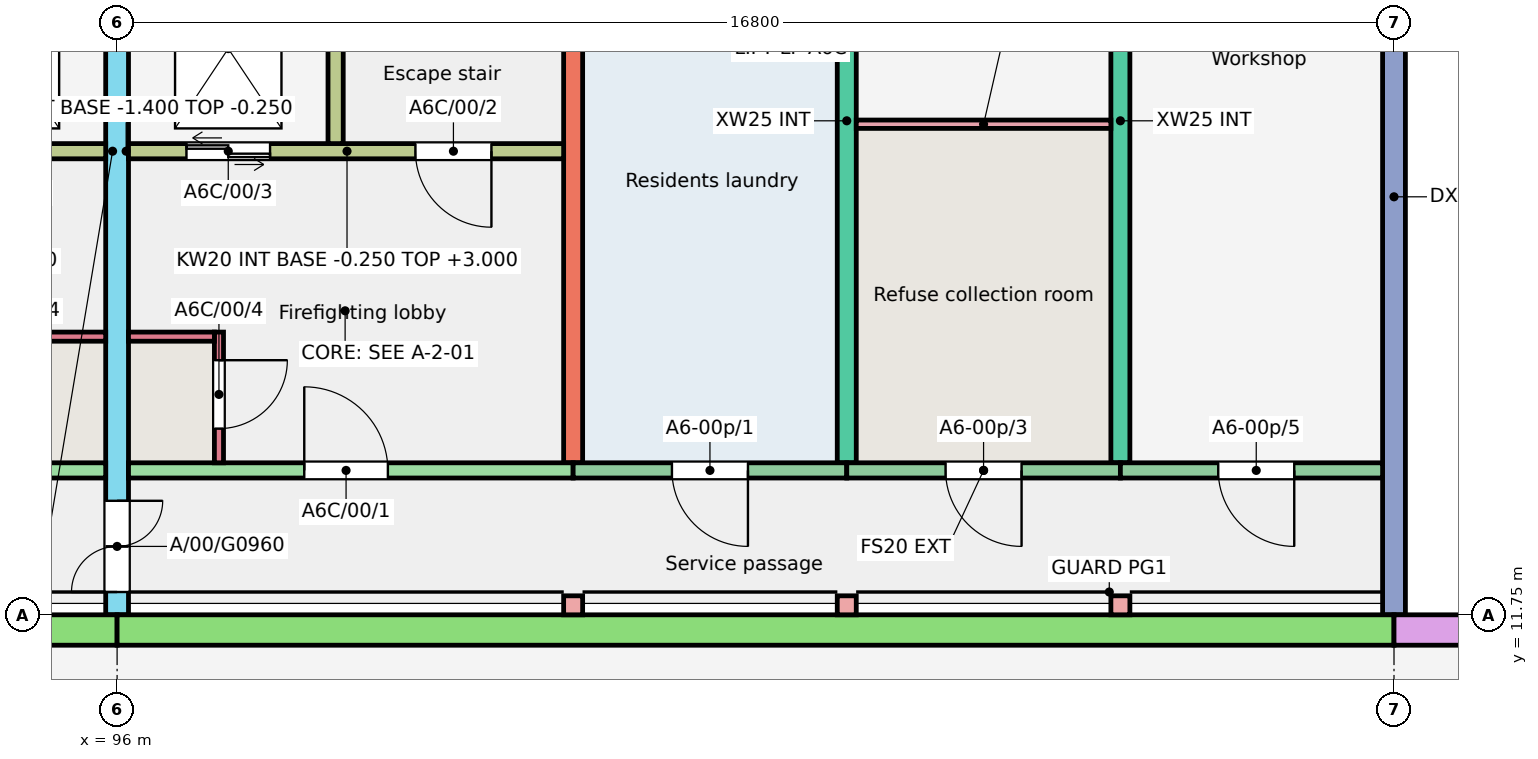
"""IFC4 building model, lengths in metres.
Left out: names, types, materials, properties, quantities, classifications, styles, units other than length and angle.
Written with IfcOpenShell. Run it as: python <this file> out.ifc"""

import sys

from ifc_helpers import new_model, si_unit, direction, frame, frame_2d, origin, origin_2d, place, context, subcontext, project, spatial, rectangle, extrude, element, fill, save


model = new_model("IFC4")
c1 = context("Model", 3, precision=1e-05, world=origin(), true_north=direction((0.0, 1.0)))
c2 = subcontext(c1, "Body", "Model", "MODEL_VIEW")
j1 = project(units=[si_unit("LENGTHUNIT", "METRE"), si_unit("PLANEANGLEUNIT", "RADIAN")], contexts=[c1])
p1 = place(None, origin())
s1 = spatial("IfcSite", under=j1, at=p1, CompositionType="ELEMENT")
p2 = place(p1, origin())
s2 = spatial("IfcBuilding", under=s1, at=p2, CompositionType="ELEMENT")
p3 = place(p2, origin())
s3 = spatial("IfcBuildingStorey", under=s2, at=p3, CompositionType="ELEMENT", Elevation=0.0)
p4 = place(p3, frame((96.0, 11.75, -0.25), z_axis=(0.0, 0.0, 1.0), x_axis=(0.0, 1.0, 0.0)))
e1 = element("IfcWall", 1, at=p4, inside=s3, PredefinedType="SHEAR", context=c2, shape_type="SweptSolid", body=[
    extrude(rectangle(XDim=11.0, YDim=0.3, at=frame_2d((5.5, 0.0))), origin(), (0.0, 0.0, 1.0), 3.25),
])
p5 = place(p4, frame((0.3, 0.0, 0.25)))
e2 = element("IfcOpeningElement", 2, at=p5, cuts=e1, PredefinedType="OPENING", context=c2, shape_type="SweptSolid", body=[
    extrude(rectangle(XDim=1.2, YDim=2.1, at=frame_2d((0.6, 1.05))), frame((0.0, 0.16, 0.0), z_axis=(0.0, -1.0, 0.0), x_axis=(1.0, 0.0, 0.0)), (0.0, 0.0, 1.0), 0.32),
])
for number, where, z_axis, x_axis in (
    (3, (102.0, 13.75, -0.25), (0.0, 0.0, 1.0), (0.0, 1.0, 0.0)),
    (4, (105.6, 13.75, -0.25), (0.0, 0.0, 1.0), (0.0, 1.0, 0.0)),
    (5, (109.2, 13.75, -0.25), (0.0, 0.0, 1.0), (0.0, 1.0, 0.0)),
):
    element("IfcWall", number, at=place(p3, frame(where, z_axis=z_axis, x_axis=x_axis)), inside=s3, PredefinedType="SHEAR", context=c2, shape_type="SweptSolid", body=[
        extrude(rectangle(XDim=9.0, YDim=0.25, at=frame_2d((4.5, 0.0))), origin(), (0.0, 0.0, 1.0), 3.25),
    ])
p6 = place(p3, frame((112.8, 11.75, -0.25), z_axis=(0.0, 0.0, 1.0), x_axis=(0.0, 1.0, 0.0)))
e6 = element("IfcWall", 6, at=p6, inside=s3, PredefinedType="SHEAR", context=c2, shape_type="SweptSolid", body=[
    extrude(rectangle(XDim=11.0, YDim=0.3, at=frame_2d((5.5, 0.0))), origin(), (0.0, 0.0, 1.0), 3.25),
])
p7 = place(p3, frame((90.0, 13.65, -0.25), z_axis=(0.0, 0.0, 1.0), x_axis=(1.0, 0.0, 0.0)))
e7 = element("IfcWall", 7, at=p7, inside=s3, PredefinedType="SHEAR", context=c2, shape_type="SweptSolid", body=[
    extrude(rectangle(XDim=5.85, YDim=0.2, at=frame_2d((2.925, 0.0))), origin(), (0.0, 0.0, 1.0), 3.25),
])
p8 = place(p7, frame((2.438, 0.0, 0.25)))
e8 = element("IfcOpeningElement", 8, at=p8, cuts=e7, PredefinedType="OPENING", context=c2, shape_type="SweptSolid", body=[
    extrude(rectangle(XDim=1.1, YDim=2.1, at=frame_2d((0.55, 1.05))), frame((0.0, 0.11, 0.0), z_axis=(0.0, -1.0, 0.0), x_axis=(1.0, 0.0, 0.0)), (0.0, 0.0, 1.0), 0.22),
])
p9 = place(p3, frame((90.125, 17.85, -0.25), z_axis=(0.0, 0.0, 1.0), x_axis=(1.0, 0.0, 0.0)))
e9 = element("IfcWall", 9, at=p9, inside=s3, PredefinedType="SHEAR", context=c2, shape_type="SweptSolid", body=[
    extrude(rectangle(XDim=5.725, YDim=0.2, at=frame_2d((2.863, 0.0))), origin(), (0.0, 0.0, 1.0), 3.25),
])
p10 = place(p9, frame((0.95, 0.0, 0.25)))
e10 = element("IfcOpeningElement", 10, at=p10, cuts=e9, PredefinedType="OPENING", context=c2, shape_type="SweptSolid", body=[
    extrude(rectangle(XDim=1.0, YDim=2.1, at=frame_2d((0.5, 1.05))), frame((0.0, 0.11, 0.0), z_axis=(0.0, -1.0, 0.0), x_axis=(1.0, 0.0, 0.0)), (0.0, 0.0, 1.0), 0.22),
])
p11 = place(p9, frame((3.863, 0.0, 0.25)))
e11 = element("IfcOpeningElement", 11, at=p11, cuts=e9, PredefinedType="OPENING", context=c2, shape_type="SweptSolid", body=[
    extrude(rectangle(XDim=1.1, YDim=2.1, at=frame_2d((0.55, 1.05))), frame((0.0, 0.11, 0.0), z_axis=(0.0, -1.0, 0.0), x_axis=(1.0, 0.0, 0.0)), (0.0, 0.0, 1.0), 0.22),
])
p12 = place(p3, frame((94.72, 15.41, -0.25), z_axis=(0.0, 0.0, 1.0), x_axis=(1.0, 0.0, 0.0)))
e12 = element("IfcWall", 12, at=p12, inside=s3, PredefinedType="SHEAR", context=c2, shape_type="SweptSolid", body=[
    extrude(rectangle(XDim=1.13, YDim=0.12, at=frame_2d((0.565, 0.0))), origin(), (0.0, 0.0, 1.0), 3.25),
])
p13 = place(p3, frame((96.15, 13.65, -0.25), z_axis=(0.0, 0.0, 1.0), x_axis=(1.0, 0.0, 0.0)))
e13 = element("IfcWall", 13, at=p13, inside=s3, PredefinedType="SHEAR", context=c2, shape_type="SweptSolid", body=[
    extrude(rectangle(XDim=5.85, YDim=0.2, at=frame_2d((2.925, 0.0))), origin(), (0.0, 0.0, 1.0), 3.25),
])
p14 = place(p13, frame((2.312, 0.0, 0.25)))
e14 = element("IfcOpeningElement", 14, at=p14, cuts=e13, PredefinedType="OPENING", context=c2, shape_type="SweptSolid", body=[
    extrude(rectangle(XDim=1.1, YDim=2.1, at=frame_2d((0.55, 1.05))), frame((0.0, 0.11, 0.0), z_axis=(0.0, -1.0, 0.0), x_axis=(1.0, 0.0, 0.0)), (0.0, 0.0, 1.0), 0.22),
])
p15 = place(p3, frame((96.15, 17.85, -0.25), z_axis=(0.0, 0.0, 1.0), x_axis=(1.0, 0.0, 0.0)))
e15 = element("IfcWall", 15, at=p15, inside=s3, PredefinedType="SHEAR", context=c2, shape_type="SweptSolid", body=[
    extrude(rectangle(XDim=5.725, YDim=0.2, at=frame_2d((2.863, 0.0))), origin(), (0.0, 0.0, 1.0), 3.25),
])
p16 = place(p15, frame((3.775, 0.0, 0.25)))
e16 = element("IfcOpeningElement", 16, at=p16, cuts=e15, PredefinedType="OPENING", context=c2, shape_type="SweptSolid", body=[
    extrude(rectangle(XDim=1.0, YDim=2.1, at=frame_2d((0.5, 1.05))), frame((0.0, 0.11, 0.0), z_axis=(0.0, -1.0, 0.0), x_axis=(1.0, 0.0, 0.0)), (0.0, 0.0, 1.0), 0.22),
])
p17 = place(p15, frame((0.762, 0.0, 0.25)))
e17 = element("IfcOpeningElement", 17, at=p17, cuts=e15, PredefinedType="OPENING", context=c2, shape_type="SweptSolid", body=[
    extrude(rectangle(XDim=1.1, YDim=2.1, at=frame_2d((0.55, 1.05))), frame((0.0, 0.11, 0.0), z_axis=(0.0, -1.0, 0.0), x_axis=(1.0, 0.0, 0.0)), (0.0, 0.0, 1.0), 0.22),
])
p18 = place(p3, frame((98.875, 17.95, -0.25), z_axis=(0.0, 0.0, 1.0), x_axis=(0.0, 1.0, 0.0)))
e18 = element("IfcWall", 18, at=p18, inside=s3, PredefinedType="SHEAR", context=c2, shape_type="SweptSolid", body=[
    extrude(rectangle(XDim=4.8, YDim=0.2, at=frame_2d((2.4, 0.0))), origin(), (0.0, 0.0, 1.0), 3.25),
])
p19 = place(p3, frame((97.34, 13.75, -0.25), z_axis=(0.0, 0.0, 1.0), x_axis=(0.0, 1.0, 0.0)))
e19 = element("IfcWall", 19, at=p19, inside=s3, PredefinedType="SHEAR", context=c2, shape_type="SweptSolid", body=[
    extrude(rectangle(XDim=1.72, YDim=0.12, at=frame_2d((0.86, 0.0))), origin(), (0.0, 0.0, 1.0), 3.25),
])
p20 = place(p19, frame((0.45, 0.0, 0.25)))
e20 = element("IfcOpeningElement", 20, at=p20, cuts=e19, PredefinedType="OPENING", context=c2, shape_type="SweptSolid", body=[
    extrude(rectangle(XDim=0.9, YDim=2.1, at=frame_2d((0.45, 1.05))), frame((0.0, 0.07, 0.0), z_axis=(0.0, -1.0, 0.0), x_axis=(1.0, 0.0, 0.0)), (0.0, 0.0, 1.0), 0.14),
])
p21 = place(p3, frame((96.15, 15.41, -0.25), z_axis=(0.0, 0.0, 1.0), x_axis=(1.0, 0.0, 0.0)))
e21 = element("IfcWall", 21, at=p21, inside=s3, PredefinedType="SHEAR", context=c2, shape_type="SweptSolid", body=[
    extrude(rectangle(XDim=1.13, YDim=0.12, at=frame_2d((0.565, 0.0))), origin(), (0.0, 0.0, 1.0), 3.25),
])
p22 = place(p3, frame((102.0, 13.65, -0.25), z_axis=(0.0, 0.0, 1.0), x_axis=(1.0, 0.0, 0.0)))
e22 = element("IfcWall", 22, at=p22, inside=s3, PredefinedType="SOLIDWALL", context=c2, shape_type="SweptSolid", body=[
    extrude(rectangle(XDim=3.6, YDim=0.2, at=frame_2d((1.8, 0.0))), origin(), (0.0, 0.0, 1.0), 3.25),
])
p23 = place(p22, frame((1.3, 0.0, 0.25)))
e23 = element("IfcOpeningElement", 23, at=p23, cuts=e22, PredefinedType="OPENING", context=c2, shape_type="SweptSolid", body=[
    extrude(rectangle(XDim=1.0, YDim=2.1, at=frame_2d((0.5, 1.05))), frame((0.0, 0.11, 0.0), z_axis=(0.0, -1.0, 0.0), x_axis=(1.0, 0.0, 0.0)), (0.0, 0.0, 1.0), 0.22),
])
p24 = place(p3, frame((105.6, 13.65, -0.25), z_axis=(0.0, 0.0, 1.0), x_axis=(1.0, 0.0, 0.0)))
e24 = element("IfcWall", 24, at=p24, inside=s3, PredefinedType="SOLIDWALL", context=c2, shape_type="SweptSolid", body=[
    extrude(rectangle(XDim=3.6, YDim=0.2, at=frame_2d((1.8, 0.0))), origin(), (0.0, 0.0, 1.0), 3.25),
])
p25 = place(p24, frame((1.3, 0.0, 0.25)))
e25 = element("IfcOpeningElement", 25, at=p25, cuts=e24, PredefinedType="OPENING", context=c2, shape_type="SweptSolid", body=[
    extrude(rectangle(XDim=1.0, YDim=2.1, at=frame_2d((0.5, 1.05))), frame((0.0, 0.11, 0.0), z_axis=(0.0, -1.0, 0.0), x_axis=(1.0, 0.0, 0.0)), (0.0, 0.0, 1.0), 0.22),
])
p26 = place(p3, frame((109.2, 13.65, -0.25), z_axis=(0.0, 0.0, 1.0), x_axis=(1.0, 0.0, 0.0)))
e26 = element("IfcWall", 26, at=p26, inside=s3, PredefinedType="SOLIDWALL", context=c2, shape_type="SweptSolid", body=[
    extrude(rectangle(XDim=3.45, YDim=0.2, at=frame_2d((1.725, 0.0))), origin(), (0.0, 0.0, 1.0), 3.25),
])
p27 = place(p26, frame((1.288, 0.0, 0.25)))
e27 = element("IfcOpeningElement", 27, at=p27, cuts=e26, PredefinedType="OPENING", context=c2, shape_type="SweptSolid", body=[
    extrude(rectangle(XDim=1.0, YDim=2.1, at=frame_2d((0.5, 1.05))), frame((0.0, 0.11, 0.0), z_axis=(0.0, -1.0, 0.0), x_axis=(1.0, 0.0, 0.0)), (0.0, 0.0, 1.0), 0.22),
])
for number, where, z_axis, x_axis in (
    (28, (102.0, 11.875, -0.25), (0.0, 0.0, 1.0), (1.0, 0.0, 0.0)),
    (29, (105.6, 11.875, -0.25), (0.0, 0.0, 1.0), (1.0, 0.0, 0.0)),
    (30, (109.2, 11.875, -0.25), (0.0, 0.0, 1.0), (1.0, 0.0, 0.0)),
):
    element("IfcColumn", number, at=place(p3, frame(where, z_axis=z_axis, x_axis=x_axis)), inside=s3, PredefinedType="COLUMN", context=c2, shape_type="SweptSolid", body=[
        extrude(rectangle(XDim=0.25, YDim=0.25, at=origin_2d()), origin(), (0.0, 0.0, 1.0), 3.25),
    ])
p28 = place(p3, frame((93.025, 17.85, -1.4), z_axis=(0.0, 0.0, 1.0), x_axis=(1.0, 0.0, 0.0)))
e31 = element("IfcWall", 31, at=p28, inside=s3, PredefinedType="SHEAR", context=c2, shape_type="SweptSolid", body=[
    extrude(rectangle(XDim=2.975, YDim=0.2, at=frame_2d((1.488, 0.0))), origin(), (0.0, 0.0, 1.0), 1.15),
])
p29 = place(p3, frame((95.925, 17.95, -1.4), z_axis=(0.0, 0.0, 1.0), x_axis=(0.0, 1.0, 0.0)))
e32 = element("IfcWall", 32, at=p29, inside=s3, PredefinedType="SHEAR", context=c2, shape_type="SweptSolid", body=[
    extrude(rectangle(XDim=3.0, YDim=0.15, at=frame_2d((1.5, 0.0))), origin(), (0.0, 0.0, 1.0), 1.15),
])
p30 = place(p3, frame((96.0, 17.85, -1.4), z_axis=(0.0, 0.0, 1.0), x_axis=(1.0, 0.0, 0.0)))
e33 = element("IfcWall", 33, at=p30, inside=s3, PredefinedType="SHEAR", context=c2, shape_type="SweptSolid", body=[
    extrude(rectangle(XDim=2.975, YDim=0.2, at=frame_2d((1.488, 0.0))), origin(), (0.0, 0.0, 1.0), 1.15),
])
p31 = place(p3, frame((98.875, 17.95, -1.4), z_axis=(0.0, 0.0, 1.0), x_axis=(0.0, 1.0, 0.0)))
e34 = element("IfcWall", 34, at=p31, inside=s3, PredefinedType="SHEAR", context=c2, shape_type="SweptSolid", body=[
    extrude(rectangle(XDim=3.0, YDim=0.2, at=frame_2d((1.5, 0.0))), origin(), (0.0, 0.0, 1.0), 1.15),
])
p32 = place(p3, frame((96.075, 17.95, -1.4), z_axis=(0.0, 0.0, 1.0), x_axis=(0.0, 1.0, 0.0)))
e35 = element("IfcWall", 35, at=p32, inside=s3, PredefinedType="SHEAR", context=c2, shape_type="SweptSolid", body=[
    extrude(rectangle(XDim=3.0, YDim=0.15, at=frame_2d((1.5, 0.0))), origin(), (0.0, 0.0, 1.0), 1.15),
])
for number, where, z_axis, x_axis in (
    (36, (79.2, 11.55, -0.25), (0.0, 0.0, 1.0), (1.0, 0.0, 0.0)),
    (37, (96.0, 11.55, -0.25), (0.0, 0.0, 1.0), (1.0, 0.0, 0.0)),
):
    element("IfcWall", number, at=place(p3, frame(where, z_axis=z_axis, x_axis=x_axis)), inside=s3, PredefinedType="SOLIDWALL", context=c2, shape_type="SweptSolid", body=[
        extrude(rectangle(XDim=16.8, YDim=0.4, at=frame_2d((8.4, 0.0))), origin(), (0.0, 0.0, 1.0), 3.25),
    ])
p33 = place(p3, frame((112.8, 11.55, -0.25), z_axis=(0.0, 0.0, 1.0), x_axis=(1.0, 0.0, 0.0)))
e38 = element("IfcWall", 38, at=p33, inside=s3, PredefinedType="SOLIDWALL", context=c2, shape_type="SweptSolid", body=[
    extrude(rectangle(XDim=14.0, YDim=0.4, at=frame_2d((7.0, 0.0))), origin(), (0.0, 0.0, 1.0), 6.25),
])
p34 = place(p3, frame((105.725, 18.205, 0.0), z_axis=(0.0, 0.0, 1.0), x_axis=(1.0, 0.0, 0.0)))
e39 = element("IfcWall", 39, at=p34, inside=s3, PredefinedType="PARTITIONING", context=c2, shape_type="SweptSolid", body=[
    extrude(rectangle(XDim=3.35, YDim=0.11, at=frame_2d((1.675, 0.0))), origin(), (0.0, 0.0, 1.0), 2.8),
])
p35 = place(p23, origin())
e40 = element("IfcDoor", 40, at=p35, inside=s3, OperationType="SINGLE_SWING_RIGHT", PredefinedType="DOOR", context=c2, shape_type="SweptSolid", body=[
    extrude(rectangle(XDim=1.0, YDim=2.1, at=frame_2d((0.5, 1.05))), frame((0.0, 0.025, 0.0), z_axis=(0.0, -1.0, 0.0), x_axis=(1.0, 0.0, 0.0)), (0.0, 0.0, 1.0), 0.05),
])
fill(e23, e40)
p36 = place(p25, origin())
e41 = element("IfcDoor", 41, at=p36, inside=s3, OperationType="SINGLE_SWING_RIGHT", PredefinedType="DOOR", context=c2, shape_type="SweptSolid", body=[
    extrude(rectangle(XDim=1.0, YDim=2.1, at=frame_2d((0.5, 1.05))), frame((0.0, 0.025, 0.0), z_axis=(0.0, -1.0, 0.0), x_axis=(1.0, 0.0, 0.0)), (0.0, 0.0, 1.0), 0.05),
])
fill(e25, e41)
p37 = place(p27, origin())
e42 = element("IfcDoor", 42, at=p37, inside=s3, OperationType="SINGLE_SWING_RIGHT", PredefinedType="DOOR", context=c2, shape_type="SweptSolid", body=[
    extrude(rectangle(XDim=1.0, YDim=2.1, at=frame_2d((0.5, 1.05))), frame((0.0, 0.025, 0.0), z_axis=(0.0, -1.0, 0.0), x_axis=(1.0, 0.0, 0.0)), (0.0, 0.0, 1.0), 0.05),
])
fill(e27, e42)
p38 = place(p14, origin())
e43 = element("IfcDoor", 43, at=p38, inside=s3, OperationType="SINGLE_SWING_LEFT", PredefinedType="DOOR", context=c2, shape_type="SweptSolid", body=[
    extrude(rectangle(XDim=1.1, YDim=2.1, at=frame_2d((0.55, 1.05))), frame((0.0, 0.025, 0.0), z_axis=(0.0, -1.0, 0.0), x_axis=(1.0, 0.0, 0.0)), (0.0, 0.0, 1.0), 0.05),
])
fill(e14, e43)
p39 = place(p16, origin())
e44 = element("IfcDoor", 44, at=p39, inside=s3, OperationType="SINGLE_SWING_RIGHT", PredefinedType="DOOR", context=c2, shape_type="SweptSolid", body=[
    extrude(rectangle(XDim=1.0, YDim=2.1, at=frame_2d((0.5, 1.05))), frame((0.0, 0.025, 0.0), z_axis=(0.0, -1.0, 0.0), x_axis=(1.0, 0.0, 0.0)), (0.0, 0.0, 1.0), 0.05),
])
fill(e16, e44)
p40 = place(p17, origin())
e45 = element("IfcDoor", 45, at=p40, inside=s3, OperationType="DOUBLE_DOOR_SLIDING", PredefinedType="DOOR", context=c2, shape_type="SweptSolid", body=[
    extrude(rectangle(XDim=1.1, YDim=2.1, at=frame_2d((0.55, 1.05))), frame((0.0, 0.025, 0.0), z_axis=(0.0, -1.0, 0.0), x_axis=(1.0, 0.0, 0.0)), (0.0, 0.0, 1.0), 0.05),
])
fill(e17, e45)
p41 = place(p20, origin())
e46 = element("IfcDoor", 46, at=p41, inside=s3, OperationType="SINGLE_SWING_RIGHT", PredefinedType="DOOR", context=c2, shape_type="SweptSolid", body=[
    extrude(rectangle(XDim=0.9, YDim=2.1, at=frame_2d((0.45, 1.05))), frame((0.0, 0.025, 0.0), z_axis=(0.0, -1.0, 0.0), x_axis=(1.0, 0.0, 0.0)), (0.0, 0.0, 1.0), 0.05),
])
fill(e20, e46)
p42 = place(p5, origin())
e47 = element("IfcDoor", 47, at=p42, inside=s3, OperationType="DOUBLE_DOOR_SINGLE_SWING", PredefinedType="DOOR", context=c2, shape_type="SweptSolid", body=[
    extrude(rectangle(XDim=1.2, YDim=2.1, at=frame_2d((0.6, 1.05))), frame((0.0, 0.025, 0.0), z_axis=(0.0, -1.0, 0.0), x_axis=(1.0, 0.0, 0.0)), (0.0, 0.0, 1.0), 0.05),
])
fill(e2, e47)
save(model, sys.argv[1])
